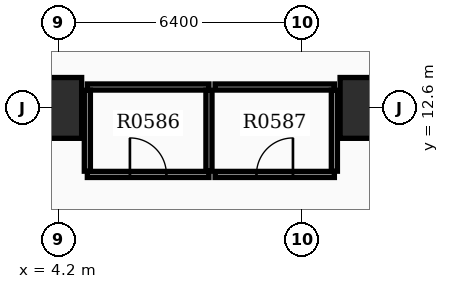
"""IFC4 building model, lengths in metres.
Left out: names, types, materials, properties, quantities, classifications, styles, units other than length and angle.
Written with IfcOpenShell. Run it as: python <this file> out.ifc"""

import sys

from ifc_helpers import new_model, si_unit, direction, frame, frame_2d, origin, origin_2d, place, context, subcontext, project, spatial, rectangle, extrude, element, fill, save


model = new_model("IFC4")
c1 = context("Model", 3, precision=1e-05, world=origin(), true_north=direction((0.0, 1.0)))
c2 = subcontext(c1, "Body", "Model", "MODEL_VIEW")
j1 = project(units=[si_unit("LENGTHUNIT", "METRE"), si_unit("PLANEANGLEUNIT", "RADIAN")], contexts=[c1])
p1 = place(None, origin())
s1 = spatial("IfcSite", under=j1, at=p1, CompositionType="ELEMENT")
p2 = place(p1, origin())
s2 = spatial("IfcBuilding", under=s1, at=p2, CompositionType="ELEMENT")
p3 = place(p2, frame((0.0, 0.0, 39.3)))
s3 = spatial("IfcBuildingStorey", under=s2, at=p3, CompositionType="ELEMENT", Elevation=39.3)
for number, where, z_axis, x_axis in (
    (1, (12.4, 12.6, 0.0), (0.0, 0.0, 1.0), (1.0, 0.0, 0.0)),
    (2, (4.0, 12.6, 0.0), (0.0, 0.0, 1.0), (1.0, 0.0, 0.0)),
):
    element("IfcColumn", number, at=place(p3, frame(where, z_axis=z_axis, x_axis=x_axis)), inside=s3, PredefinedType="COLUMN", context=c2, shape_type="SweptSolid", body=[
        extrude(rectangle(XDim=1.6, YDim=1.6, at=origin_2d()), origin(), (0.0, 0.0, 1.0), 3.9),
    ])
p4 = place(p3, frame((4.95, 10.85, 0.0), z_axis=(0.0, 0.0, 1.0), x_axis=(1.0, 0.0, 0.0)))
e3 = element("IfcWall", 3, at=p4, inside=s3, PredefinedType="PARTITIONING", context=c2, shape_type="SweptSolid", body=[
    extrude(rectangle(XDim=3.2, YDim=0.16, at=frame_2d((1.6, 0.0))), origin(), (0.0, 0.0, 1.0), 2.9),
])
p5 = place(p4, frame((1.12, 0.0, 0.0)))
e4 = element("IfcOpeningElement", 4, at=p5, cuts=e3, PredefinedType="OPENING", context=c2, shape_type="SweptSolid", body=[
    extrude(rectangle(XDim=0.96, YDim=2.15, at=frame_2d((0.48, 1.075))), frame((0.0, 0.09, 0.0), z_axis=(0.0, -1.0, 0.0), x_axis=(1.0, 0.0, 0.0)), (0.0, 0.0, 1.0), 0.18),
])
p6 = place(p3, frame((4.95, 13.15, 0.0), z_axis=(0.0, 0.0, 1.0), x_axis=(1.0, 0.0, 0.0)))
e5 = element("IfcWall", 5, at=p6, inside=s3, PredefinedType="PARTITIONING", context=c2, shape_type="SweptSolid", body=[
    extrude(rectangle(XDim=3.2, YDim=0.16, at=frame_2d((1.6, 0.0))), origin(), (0.0, 0.0, 1.0), 2.9),
])
for number, where, z_axis, x_axis in (
    (6, (4.95, 10.935, 0.0), (0.0, 0.0, 1.0), (0.0, 1.0, 0.0)),
    (7, (8.15, 10.935, 0.0), (0.0, 0.0, 1.0), (0.0, 1.0, 0.0)),
):
    element("IfcWall", number, at=place(p3, frame(where, z_axis=z_axis, x_axis=x_axis)), inside=s3, PredefinedType="PARTITIONING", context=c2, shape_type="SweptSolid", body=[
        extrude(rectangle(XDim=2.13, YDim=0.16, at=frame_2d((1.065, 0.0))), origin(), (0.0, 0.0, 1.0), 2.9),
    ])
p7 = place(p3, frame((8.31, 10.85, 0.0), z_axis=(0.0, 0.0, 1.0), x_axis=(1.0, 0.0, 0.0)))
e8 = element("IfcWall", 8, at=p7, inside=s3, PredefinedType="PARTITIONING", context=c2, shape_type="SweptSolid", body=[
    extrude(rectangle(XDim=3.14, YDim=0.16, at=frame_2d((1.57, 0.0))), origin(), (0.0, 0.0, 1.0), 2.9),
])
p8 = place(p7, frame((1.09, 0.0, 0.0)))
e9 = element("IfcOpeningElement", 9, at=p8, cuts=e8, PredefinedType="OPENING", context=c2, shape_type="SweptSolid", body=[
    extrude(rectangle(XDim=0.96, YDim=2.15, at=frame_2d((0.48, 1.075))), frame((0.0, 0.09, 0.0), z_axis=(0.0, -1.0, 0.0), x_axis=(1.0, 0.0, 0.0)), (0.0, 0.0, 1.0), 0.18),
])
p9 = place(p3, frame((8.31, 13.15, 0.0), z_axis=(0.0, 0.0, 1.0), x_axis=(1.0, 0.0, 0.0)))
e10 = element("IfcWall", 10, at=p9, inside=s3, PredefinedType="PARTITIONING", context=c2, shape_type="SweptSolid", body=[
    extrude(rectangle(XDim=3.14, YDim=0.16, at=frame_2d((1.57, 0.0))), origin(), (0.0, 0.0, 1.0), 2.9),
])
p10 = place(p3, frame((11.45, 10.935, 0.0), z_axis=(0.0, 0.0, 1.0), x_axis=(0.0, 1.0, 0.0)))
e11 = element("IfcWall", 11, at=p10, inside=s3, PredefinedType="PARTITIONING", context=c2, shape_type="SweptSolid", body=[
    extrude(rectangle(XDim=2.13, YDim=0.16, at=frame_2d((1.065, 0.0))), origin(), (0.0, 0.0, 1.0), 2.9),
])
p11 = place(p5, origin())
e12 = element("IfcDoor", 12, at=p11, inside=s3, OperationType="SINGLE_SWING_LEFT", PredefinedType="DOOR", context=c2, shape_type="SweptSolid", body=[
    extrude(rectangle(XDim=0.96, YDim=2.15, at=frame_2d((0.48, 1.075))), frame((0.0, 0.025, 0.0), z_axis=(0.0, -1.0, 0.0), x_axis=(1.0, 0.0, 0.0)), (0.0, 0.0, 1.0), 0.05),
])
fill(e4, e12)
p12 = place(p8, origin())
e13 = element("IfcDoor", 13, at=p12, inside=s3, OperationType="SINGLE_SWING_RIGHT", PredefinedType="DOOR", context=c2, shape_type="SweptSolid", body=[
    extrude(rectangle(XDim=0.96, YDim=2.15, at=frame_2d((0.48, 1.075))), frame((0.0, 0.025, 0.0), z_axis=(0.0, -1.0, 0.0), x_axis=(1.0, 0.0, 0.0)), (0.0, 0.0, 1.0), 0.05),
])
fill(e9, e13)
save(model, sys.argv[1])
